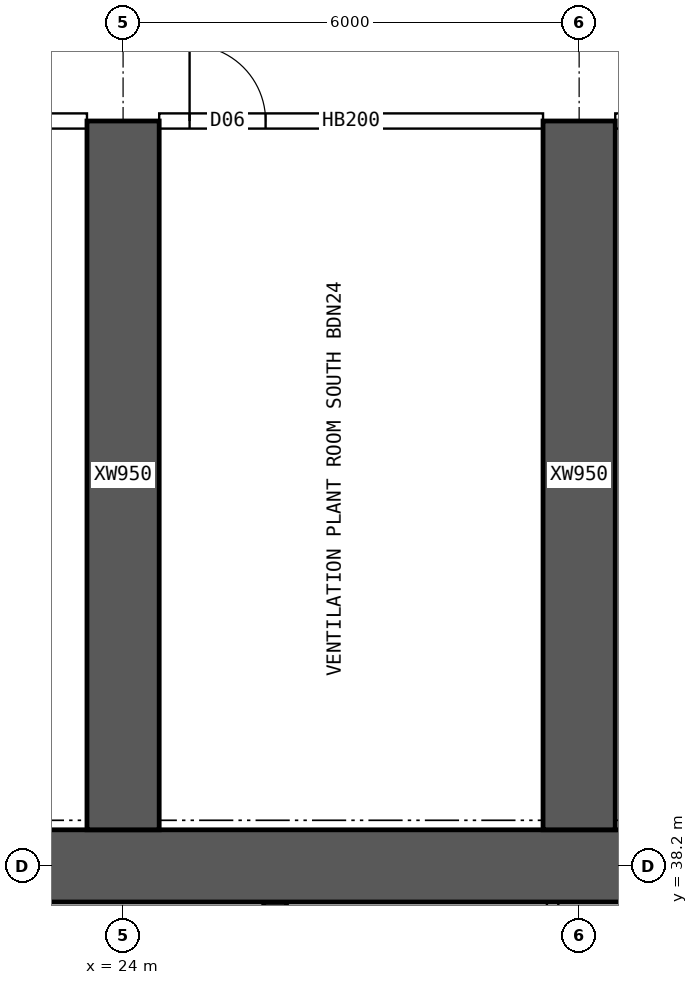
"""IFC4 building model, lengths in metres.
Left out: names, types, materials, properties, quantities, classifications, styles, units other than length and angle.
Written with IfcOpenShell. Run it as: python <this file> out.ifc"""

import sys

from ifc_helpers import new_model, si_unit, direction, frame, frame_2d, origin, place, context, subcontext, project, spatial, rectangle, extrude, element, fill, save


model = new_model("IFC4")
c1 = context("Model", 3, precision=1e-05, world=origin(), true_north=direction((0.0, 1.0)))
c2 = subcontext(c1, "Body", "Model", "MODEL_VIEW")
j1 = project(units=[si_unit("LENGTHUNIT", "METRE"), si_unit("PLANEANGLEUNIT", "RADIAN")], contexts=[c1])
p1 = place(None, origin())
s1 = spatial("IfcSite", under=j1, at=p1, CompositionType="ELEMENT")
p2 = place(p1, origin())
s2 = spatial("IfcBuilding", under=s1, at=p2, CompositionType="ELEMENT")
p3 = place(p2, frame((0.0, 0.0, 99.4)))
s3 = spatial("IfcBuildingStorey", under=s2, at=p3, CompositionType="ELEMENT", Elevation=99.4)
p4 = place(p3, frame((18.0, 38.2, 0.0), z_axis=(0.0, 0.0, 1.0), x_axis=(1.0, 0.0, 0.0)))
e1 = element("IfcWall", 1, at=p4, inside=s3, PredefinedType="SHEAR", context=c2, shape_type="SweptSolid", body=[
    extrude(rectangle(XDim=48.0, YDim=0.95, at=frame_2d((24.0, 0.0))), origin(), (0.0, 0.0, 1.0), 3.75),
])
p5 = place(p3, frame((26.0, 34.75, 0.0), z_axis=(0.0, 0.0, 1.0), x_axis=(0.0, 1.0, 0.0)))
e2 = element("IfcWall", 2, at=p5, inside=s3, PredefinedType="SHEAR", context=c2, shape_type="SweptSolid", body=[
    extrude(rectangle(XDim=2.975, YDim=0.3, at=frame_2d((1.488, 0.0))), origin(), (0.0, 0.0, 1.0), 3.75),
])
for number, where, z_axis, x_axis in (
    (3, (24.0, 38.675, 0.0), (0.0, 0.0, 1.0), (0.0, 1.0, 0.0)),
    (4, (30.0, 38.675, 0.0), (0.0, 0.0, 1.0), (0.0, 1.0, 0.0)),
):
    element("IfcWall", number, at=place(p3, frame(where, z_axis=z_axis, x_axis=x_axis)), inside=s3, PredefinedType="SHEAR", context=c2, shape_type="SweptSolid", body=[
        extrude(rectangle(XDim=9.325, YDim=0.95, at=frame_2d((4.663, 0.0))), origin(), (0.0, 0.0, 1.0), 3.75),
    ])
p6 = place(p3, frame((29.651, 34.75, 0.0), z_axis=(0.0, 0.0, 1.0), x_axis=(0.0, 1.0, 0.0)))
e5 = element("IfcWall", 5, at=p6, inside=s3, PredefinedType="SOLIDWALL", context=c2, shape_type="SweptSolid", body=[
    extrude(rectangle(XDim=2.975, YDim=0.15, at=frame_2d((1.488, 0.0))), origin(), (0.0, 0.0, 1.0), 3.5),
])
p7 = place(p3, frame((18.475, 48.0, 0.0), z_axis=(0.0, 0.0, 1.0), x_axis=(1.0, 0.0, 0.0)))
e6 = element("IfcWall", 6, at=p7, inside=s3, PredefinedType="SOLIDWALL", context=c2, shape_type="SweptSolid", body=[
    extrude(rectangle(XDim=5.05, YDim=0.2, at=frame_2d((2.525, 0.0))), origin(), (0.0, 0.0, 1.0), 3.5),
])
p8 = place(p7, frame((0.35, 0.0, 0.0)))
e7 = element("IfcOpeningElement", 7, at=p8, cuts=e6, PredefinedType="OPENING", context=c2, shape_type="SweptSolid", body=[
    extrude(rectangle(XDim=0.9, YDim=2.1, at=frame_2d((0.45, 1.05))), frame((0.0, 0.11, 0.0), z_axis=(0.0, -1.0, 0.0), x_axis=(1.0, 0.0, 0.0)), (0.0, 0.0, 1.0), 0.22),
])
p9 = place(p7, frame((2.665, 0.0, 0.0)))
e8 = element("IfcOpeningElement", 8, at=p9, cuts=e6, PredefinedType="OPENING", context=c2, shape_type="SweptSolid", body=[
    extrude(rectangle(XDim=0.9, YDim=2.1, at=frame_2d((0.45, 1.05))), frame((0.0, 0.11, 0.0), z_axis=(0.0, -1.0, 0.0), x_axis=(1.0, 0.0, 0.0)), (0.0, 0.0, 1.0), 0.22),
])
p10 = place(p3, frame((24.475, 48.0, 0.0), z_axis=(0.0, 0.0, 1.0), x_axis=(1.0, 0.0, 0.0)))
e9 = element("IfcWall", 9, at=p10, inside=s3, PredefinedType="SOLIDWALL", context=c2, shape_type="SweptSolid", body=[
    extrude(rectangle(XDim=5.05, YDim=0.2, at=frame_2d((2.525, 0.0))), origin(), (0.0, 0.0, 1.0), 3.5),
])
p11 = place(p10, frame((0.4, 0.0, 0.0)))
e10 = element("IfcOpeningElement", 10, at=p11, cuts=e9, PredefinedType="OPENING", context=c2, shape_type="SweptSolid", body=[
    extrude(rectangle(XDim=1.0, YDim=2.1, at=frame_2d((0.5, 1.05))), frame((0.0, 0.11, 0.0), z_axis=(0.0, -1.0, 0.0), x_axis=(1.0, 0.0, 0.0)), (0.0, 0.0, 1.0), 0.22),
])
p12 = place(p3, frame((30.475, 48.0, 0.0), z_axis=(0.0, 0.0, 1.0), x_axis=(1.0, 0.0, 0.0)))
e11 = element("IfcWall", 11, at=p12, inside=s3, PredefinedType="SOLIDWALL", context=c2, shape_type="SweptSolid", body=[
    extrude(rectangle(XDim=5.05, YDim=0.2, at=frame_2d((2.525, 0.0))), origin(), (0.0, 0.0, 1.0), 3.5),
])
p13 = place(p12, frame((0.35, 0.0, 0.0)))
e12 = element("IfcOpeningElement", 12, at=p13, cuts=e11, PredefinedType="OPENING", context=c2, shape_type="SweptSolid", body=[
    extrude(rectangle(XDim=0.9, YDim=2.1, at=frame_2d((0.45, 1.05))), frame((0.0, 0.11, 0.0), z_axis=(0.0, -1.0, 0.0), x_axis=(1.0, 0.0, 0.0)), (0.0, 0.0, 1.0), 0.22),
])
p14 = place(p12, frame((2.705, 0.0, 0.0)))
e13 = element("IfcOpeningElement", 13, at=p14, cuts=e11, PredefinedType="OPENING", context=c2, shape_type="SweptSolid", body=[
    extrude(rectangle(XDim=0.9, YDim=2.1, at=frame_2d((0.45, 1.05))), frame((0.0, 0.11, 0.0), z_axis=(0.0, -1.0, 0.0), x_axis=(1.0, 0.0, 0.0)), (0.0, 0.0, 1.0), 0.22),
])
p15 = place(p11, origin())
e14 = element("IfcDoor", 14, at=p15, inside=s3, OperationType="SINGLE_SWING_LEFT", PredefinedType="DOOR", context=c2, shape_type="SweptSolid", body=[
    extrude(rectangle(XDim=1.0, YDim=2.1, at=frame_2d((0.5, 1.05))), frame((0.0, 0.025, 0.0), z_axis=(0.0, -1.0, 0.0), x_axis=(1.0, 0.0, 0.0)), (0.0, 0.0, 1.0), 0.05),
])
fill(e10, e14)
save(model, sys.argv[1])
